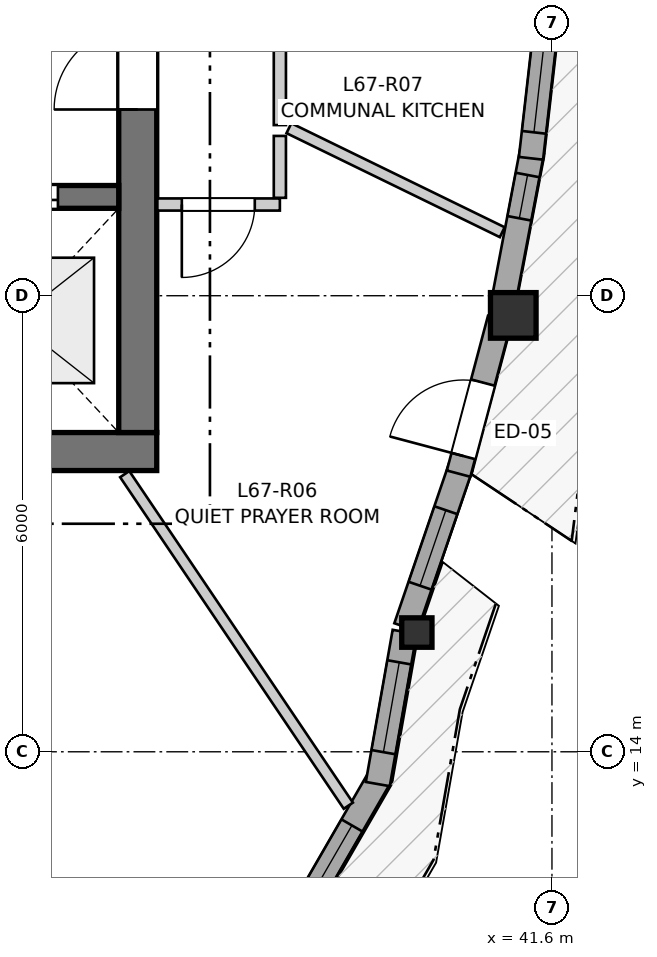
"""IFC4 building model, lengths in metres.
Left out: names, types, materials, properties, quantities, classifications, styles, units other than length and angle.
Written with IfcOpenShell. Run it as: python <this file> out.ifc"""

import sys

from ifc_helpers import new_model, si_unit, direction, frame, frame_2d, origin, origin_2d, place, context, subcontext, project, spatial, rectangle, i_section, extrude, source, transform, mapped, element, fill, save


model = new_model("IFC4")
c1 = context("Model", 3, precision=1e-05, world=origin(), true_north=direction((0.0, 1.0)))
c2 = subcontext(c1, "Body", "Model", "MODEL_VIEW")
j1 = project(units=[si_unit("LENGTHUNIT", "METRE"), si_unit("PLANEANGLEUNIT", "RADIAN")], contexts=[c1])
p1 = place(None, origin())
s1 = spatial("IfcSite", under=j1, at=p1, CompositionType="ELEMENT")
p2 = place(p1, origin())
s2 = spatial("IfcBuilding", under=s1, at=p2, CompositionType="ELEMENT")
p3 = place(p2, frame((0.0, 0.0, 224.4)))
s3 = spatial("IfcBuildingStorey", under=s2, at=p3, CompositionType="ELEMENT", Elevation=224.4)
p4 = place(p3, frame((24.3, 17.95, 0.0), z_axis=(0.0, 0.0, 1.0), x_axis=(1.0, 0.0, 0.0)))
e1 = element("IfcWall", 1, at=p4, inside=s3, PredefinedType="SHEAR", context=c2, shape_type="SweptSolid", body=[
    extrude(rectangle(XDim=12.1, YDim=0.5, at=frame_2d((6.05, 0.0))), origin(), (0.0, 0.0, 1.0), 2.96),
])
p5 = place(p3, frame((36.15, 18.2, 0.0), z_axis=(0.0, 0.0, 1.0), x_axis=(0.0, 1.0, 0.0)))
e2 = element("IfcWall", 2, at=p5, inside=s3, PredefinedType="SHEAR", context=c2, shape_type="SweptSolid", body=[
    extrude(rectangle(XDim=15.6, YDim=0.5, at=frame_2d((7.8, 0.0))), origin(), (0.0, 0.0, 1.0), 2.96),
])
p6 = place(p5, frame((4.25, 0.0, 0.0)))
e3 = element("IfcOpeningElement", 3, at=p6, cuts=e2, PredefinedType="OPENING", context=c2, shape_type="SweptSolid", body=[
    extrude(rectangle(XDim=1.1, YDim=2.15, at=frame_2d((0.55, 1.075))), frame((0.0, 0.26, 0.0), z_axis=(0.0, -1.0, 0.0), x_axis=(1.0, 0.0, 0.0)), (0.0, 0.0, 1.0), 0.52),
])
p7 = place(p5, frame((10.25, 0.0, 0.0)))
e4 = element("IfcOpeningElement", 4, at=p7, cuts=e2, PredefinedType="OPENING", context=c2, shape_type="SweptSolid", body=[
    extrude(rectangle(XDim=1.1, YDim=2.15, at=frame_2d((0.55, 1.075))), frame((0.0, 0.26, 0.0), z_axis=(0.0, -1.0, 0.0), x_axis=(1.0, 0.0, 0.0)), (0.0, 0.0, 1.0), 0.52),
])
p8 = place(p3, frame((24.8, 21.3, 0.0), z_axis=(0.0, 0.0, 1.0), x_axis=(1.0, 0.0, 0.0)))
e5 = element("IfcWall", 5, at=p8, inside=s3, PredefinedType="SHEAR", context=c2, shape_type="SweptSolid", body=[
    extrude(rectangle(XDim=11.1, YDim=0.3, at=frame_2d((5.55, 0.0))), origin(), (0.0, 0.0, 1.0), 2.96),
])
p9 = place(p8, frame((6.22, 0.0, 0.0)))
e6 = element("IfcOpeningElement", 6, at=p9, cuts=e5, PredefinedType="OPENING", context=c2, shape_type="SweptSolid", body=[
    extrude(rectangle(XDim=0.98, YDim=2.15, at=frame_2d((0.49, 1.075))), frame((0.0, 0.16, 0.0), z_axis=(0.0, -1.0, 0.0), x_axis=(1.0, 0.0, 0.0)), (0.0, 0.0, 1.0), 0.32),
])
p10 = place(p8, frame((9.15, 0.0, 0.0)))
e7 = element("IfcOpeningElement", 7, at=p10, cuts=e5, PredefinedType="OPENING", context=c2, shape_type="SweptSolid", body=[
    extrude(rectangle(XDim=1.15, YDim=2.15, at=frame_2d((0.575, 1.075))), frame((0.0, 0.16, 0.0), z_axis=(0.0, -1.0, 0.0), x_axis=(1.0, 0.0, 0.0)), (0.0, 0.0, 1.0), 0.32),
])
m1 = source(origin(), c2, "Body", "SweptSolid", [
    extrude(i_section(OverallWidth=0.398, OverallDepth=0.387, WebThickness=0.019, FlangeThickness=0.03, FilletRadius=0.015, at=origin_2d()), origin(), (0.0, 0.0, 1.0), 2.96),
])
p11 = place(p3, frame((39.823, 15.569, 0.0), z_axis=(0.0, 0.0, 1.0), x_axis=(1.0, 0.0, 0.0)))
e8 = element("IfcColumn", 8, at=p11, inside=s3, PredefinedType="PILASTER", context=c2, shape_type="MappedRepresentation", body=[
    mapped(m1, transform((0.0, 0.0, 0.0), x_axis=(1.0, 0.0, 0.0), y_axis=(0.0, 1.0, 0.0), z_axis=(0.0, 0.0, 1.0), scale=1.0)),
])
m2 = source(origin(), c2, "Body", "SweptSolid", [
    extrude(rectangle(XDim=0.6, YDim=0.6, at=origin_2d()), origin(), (0.0, 0.0, 1.0), 2.96),
])
p12 = place(p3, frame((41.091, 19.741, 0.0), z_axis=(0.0, 0.0, 1.0), x_axis=(1.0, 0.0, 0.0)))
e9 = element("IfcColumn", 9, at=p12, inside=s3, PredefinedType="COLUMN", context=c2, shape_type="MappedRepresentation", body=[
    mapped(m2, transform((0.0, 0.0, 0.0), x_axis=(1.0, 0.0, 0.0), y_axis=(0.0, 1.0, 0.0), z_axis=(0.0, 0.0, 1.0), scale=1.0)),
])
p13 = place(p3, frame((38.308, 11.888, 0.0), z_axis=(0.0, 0.0, 1.0), x_axis=(0.49990781971, 0.866078617559, 0.0)))
e10 = element("IfcWall", 10, at=p13, inside=s3, PredefinedType="SOLIDWALL", context=c2, shape_type="SweptSolid", body=[
    extrude(rectangle(XDim=2.09, YDim=0.32, at=frame_2d((1.045, 0.0))), origin(), (0.0, 0.0, 1.0), 2.58),
])
p14 = place(p13, frame((0.271, 0.0, 0.82)))
e11 = element("IfcOpeningElement", 11, at=p14, cuts=e10, PredefinedType="OPENING", context=c2, shape_type="SweptSolid", body=[
    extrude(rectangle(XDim=1.05, YDim=1.45, at=frame_2d((0.525, 0.725))), frame((0.0, 0.17, 0.0), z_axis=(0.0, -1.0, 0.0), x_axis=(1.0, 0.0, 0.0)), (0.0, 0.0, 1.0), 0.34),
])
p15 = place(p3, frame((39.309, 13.575, 0.0), z_axis=(0.0, 0.0, 1.0), x_axis=(0.17370309897, 0.984798067326, 0.0)))
e12 = element("IfcWall", 12, at=p15, inside=s3, PredefinedType="SOLIDWALL", context=c2, shape_type="SweptSolid", body=[
    extrude(rectangle(XDim=2.032, YDim=0.32, at=frame_2d((1.016, 0.0))), origin(), (0.0, 0.0, 1.0), 2.58),
])
p16 = place(p15, frame((0.426, 0.0, 0.82)))
e13 = element("IfcOpeningElement", 13, at=p16, cuts=e12, PredefinedType="OPENING", context=c2, shape_type="SweptSolid", body=[
    extrude(rectangle(XDim=1.2, YDim=1.45, at=frame_2d((0.6, 0.725))), frame((0.0, 0.17, 0.0), z_axis=(0.0, -1.0, 0.0), x_axis=(1.0, 0.0, 0.0)), (0.0, 0.0, 1.0), 0.34),
])
p17 = place(p3, frame((39.677, 15.639, 0.0), z_axis=(0.0, 0.0, 1.0), x_axis=(0.323664392341, 0.946171951143, 0.0)))
e14 = element("IfcWall", 14, at=p17, inside=s3, PredefinedType="SOLIDWALL", context=c2, shape_type="SweptSolid", body=[
    extrude(rectangle(XDim=2.223, YDim=0.32, at=frame_2d((1.111, 0.0))), origin(), (0.0, 0.0, 1.0), 2.58),
])
p18 = place(p17, frame((0.576, 0.0, 0.82)))
e15 = element("IfcOpeningElement", 15, at=p18, cuts=e14, PredefinedType="OPENING", context=c2, shape_type="SweptSolid", body=[
    extrude(rectangle(XDim=1.05, YDim=1.45, at=frame_2d((0.525, 0.725))), frame((0.0, 0.17, 0.0), z_axis=(0.0, -1.0, 0.0), x_axis=(1.0, 0.0, 0.0)), (0.0, 0.0, 1.0), 0.34),
])
p19 = place(p3, frame((40.372, 17.659, 0.0), z_axis=(0.0, 0.0, 1.0), x_axis=(0.2570422776, 0.966400159109, 0.0)))
e16 = element("IfcWall", 16, at=p19, inside=s3, PredefinedType="SOLIDWALL", context=c2, shape_type="SweptSolid", body=[
    extrude(rectangle(XDim=2.107, YDim=0.32, at=frame_2d((1.053, 0.0))), origin(), (0.0, 0.0, 1.0), 2.58),
])
p20 = place(p19, frame((0.24, 0.0, 0.0)))
e17 = element("IfcOpeningElement", 17, at=p20, cuts=e16, PredefinedType="OPENING", context=c2, shape_type="SweptSolid", body=[
    extrude(rectangle(XDim=1.0, YDim=2.1, at=frame_2d((0.5, 1.05))), frame((0.0, 0.17, 0.0), z_axis=(0.0, -1.0, 0.0), x_axis=(1.0, 0.0, 0.0)), (0.0, 0.0, 1.0), 0.34),
])
p21 = place(p3, frame((40.95, 19.86, 0.0), z_axis=(0.0, 0.0, 1.0), x_axis=(0.18667884524, 0.982420993638, 0.0)))
e18 = element("IfcWall", 18, at=p21, inside=s3, PredefinedType="SOLIDWALL", context=c2, shape_type="SweptSolid", body=[
    extrude(rectangle(XDim=2.072, YDim=0.32, at=frame_2d((1.036, 0.0))), origin(), (0.0, 0.0, 1.0), 2.58),
])
p22 = place(p21, frame((1.18, 0.0, 0.82)))
e19 = element("IfcOpeningElement", 19, at=p22, cuts=e18, PredefinedType="OPENING", context=c2, shape_type="SweptSolid", body=[
    extrude(rectangle(XDim=0.58, YDim=1.35, at=frame_2d((0.29, 0.675))), frame((0.0, 0.17, 0.0), z_axis=(0.0, -1.0, 0.0), x_axis=(1.0, 0.0, 0.0)), (0.0, 0.0, 1.0), 0.34),
])
p23 = place(p3, frame((41.324, 21.808, 0.0), z_axis=(0.0, 0.0, 1.0), x_axis=(0.113315758547, 0.993559026362, 0.0)))
e20 = element("IfcWall", 20, at=p23, inside=s3, PredefinedType="SOLIDWALL", context=c2, shape_type="SweptSolid", body=[
    extrude(rectangle(XDim=2.118, YDim=0.32, at=frame_2d((1.059, 0.0))), origin(), (0.0, 0.0, 1.0), 2.58),
])
p24 = place(p23, frame((0.344, 0.0, 0.82)))
e21 = element("IfcOpeningElement", 21, at=p24, cuts=e20, PredefinedType="OPENING", context=c2, shape_type="SweptSolid", body=[
    extrude(rectangle(XDim=1.45, YDim=1.25, at=frame_2d((0.725, 0.625))), frame((0.0, 0.17, 0.0), z_axis=(0.0, -1.0, 0.0), x_axis=(1.0, 0.0, 0.0)), (0.0, 0.0, 1.0), 0.34),
])
p25 = place(p3, frame((38.02, 25.659, 0.0), z_axis=(0.0, 0.0, 1.0), x_axis=(0.0, -1.0, 0.0)))
e22 = element("IfcWall", 22, at=p25, inside=s3, PredefinedType="PARTITIONING", context=c2, shape_type="SweptSolid", body=[
    extrude(rectangle(XDim=3.414, YDim=0.16, at=frame_2d((1.707, 0.0))), origin(), (0.0, 0.0, 1.0), 2.628),
])
p26 = place(p25, frame((1.033, 0.0, 0.0)))
e23 = element("IfcOpeningElement", 23, at=p26, cuts=e22, PredefinedType="OPENING", context=c2, shape_type="SweptSolid", body=[
    extrude(rectangle(XDim=1.3, YDim=2.1, at=frame_2d((0.65, 1.05))), frame((0.0, 0.09, 0.0), z_axis=(0.0, -1.0, 0.0), x_axis=(1.0, 0.0, 0.0)), (0.0, 0.0, 1.0), 0.18),
])
p27 = place(p3, frame((38.02, 21.2, 0.0), z_axis=(0.0, 0.0, 1.0), x_axis=(-1.0, 0.0, 0.0)))
e24 = element("IfcWall", 24, at=p27, inside=s3, PredefinedType="PARTITIONING", context=c2, shape_type="SweptSolid", body=[
    extrude(rectangle(XDim=1.612, YDim=0.16, at=frame_2d((0.806, 0.0))), origin(), (0.0, 0.0, 1.0), 2.96),
])
p28 = place(p27, frame((0.33, 0.0, 0.0)))
e25 = element("IfcOpeningElement", 25, at=p28, cuts=e24, PredefinedType="OPENING", context=c2, shape_type="SweptSolid", body=[
    extrude(rectangle(XDim=0.96, YDim=2.1, at=frame_2d((0.48, 1.05))), frame((0.0, 0.09, 0.0), z_axis=(0.0, -1.0, 0.0), x_axis=(1.0, 0.0, 0.0)), (0.0, 0.0, 1.0), 0.18),
])
p29 = place(p3, frame((35.979, 17.653, 0.0), z_axis=(0.0, 0.0, 1.0), x_axis=(0.559125350393, -0.829083133677, 0.0)))
e26 = element("IfcWall", 26, at=p29, inside=s3, PredefinedType="PARTITIONING", context=c2, shape_type="SweptSolid", body=[
    extrude(rectangle(XDim=5.262, YDim=0.145, at=frame_2d((2.631, 0.0))), origin(), (0.0, 0.0, 1.0), 2.96),
])
p30 = place(p3, frame((38.139, 22.204, 0.0), z_axis=(0.0, 0.0, 1.0), x_axis=(0.898869860356, -0.43821567081, 0.0)))
e27 = element("IfcWall", 27, at=p30, inside=s3, PredefinedType="PARTITIONING", context=c2, shape_type="SweptSolid", body=[
    extrude(rectangle(XDim=3.123, YDim=0.145, at=frame_2d((1.562, 0.0))), origin(), (0.0, 0.0, 1.0), 2.96),
])
p31 = place(p3, frame((38.02, 21.288, 0.0), z_axis=(0.0, 0.0, 1.0), x_axis=(0.0, 1.0, 0.0)))
e28 = element("IfcWall", 28, at=p31, inside=s3, PredefinedType="PARTITIONING", context=c2, shape_type="SweptSolid", body=[
    extrude(rectangle(XDim=0.814, YDim=0.16, at=frame_2d((0.407, 0.0))), origin(), (0.0, 0.0, 1.0), 2.628),
])
m3 = source(origin(), c2, "Body", "SweptSolid", [
    extrude(rectangle(XDim=1.05, YDim=1.45, at=frame_2d((0.525, 0.725))), frame((0.0, 0.03, 0.0), z_axis=(0.0, -1.0, 0.0), x_axis=(1.0, 0.0, 0.0)), (0.0, 0.0, 1.0), 0.06),
])
p32 = place(p14, origin())
e29 = element("IfcWindow", 29, at=p32, inside=s3, PartitioningType="SINGLE_PANEL", PredefinedType="WINDOW", context=c2, shape_type="MappedRepresentation", body=[
    mapped(m3, transform((0.0, 0.0, 0.0), x_axis=(1.0, 0.0, 0.0), y_axis=(0.0, 1.0, 0.0), z_axis=(0.0, 0.0, 1.0), scale=1.0)),
])
fill(e11, e29)
m4 = source(origin(), c2, "Body", "SweptSolid", [
    extrude(rectangle(XDim=1.2, YDim=1.45, at=frame_2d((0.6, 0.725))), frame((0.0, 0.03, 0.0), z_axis=(0.0, -1.0, 0.0), x_axis=(1.0, 0.0, 0.0)), (0.0, 0.0, 1.0), 0.06),
])
p33 = place(p16, origin())
e30 = element("IfcWindow", 30, at=p33, inside=s3, PartitioningType="SINGLE_PANEL", PredefinedType="WINDOW", context=c2, shape_type="MappedRepresentation", body=[
    mapped(m4, transform((0.0, 0.0, 0.0), x_axis=(1.0, 0.0, 0.0), y_axis=(0.0, 1.0, 0.0), z_axis=(0.0, 0.0, 1.0), scale=1.0)),
])
fill(e13, e30)
p34 = place(p18, origin())
e31 = element("IfcWindow", 31, at=p34, inside=s3, PartitioningType="SINGLE_PANEL", PredefinedType="WINDOW", context=c2, shape_type="MappedRepresentation", body=[
    mapped(m3, transform((0.0, 0.0, 0.0), x_axis=(1.0, 0.0, 0.0), y_axis=(0.0, 1.0, 0.0), z_axis=(0.0, 0.0, 1.0), scale=1.0)),
])
fill(e15, e31)
m5 = source(origin(), c2, "Body", "SweptSolid", [
    extrude(rectangle(XDim=0.58, YDim=1.35, at=frame_2d((0.29, 0.675))), frame((0.0, 0.03, 0.0), z_axis=(0.0, -1.0, 0.0), x_axis=(1.0, 0.0, 0.0)), (0.0, 0.0, 1.0), 0.06),
])
p35 = place(p22, origin())
e32 = element("IfcWindow", 32, at=p35, inside=s3, PartitioningType="SINGLE_PANEL", PredefinedType="WINDOW", context=c2, shape_type="MappedRepresentation", body=[
    mapped(m5, transform((0.0, 0.0, 0.0), x_axis=(1.0, 0.0, 0.0), y_axis=(0.0, 1.0, 0.0), z_axis=(0.0, 0.0, 1.0), scale=1.0)),
])
fill(e19, e32)
m6 = source(origin(), c2, "Body", "SweptSolid", [
    extrude(rectangle(XDim=1.45, YDim=1.25, at=frame_2d((0.725, 0.625))), frame((0.0, 0.03, 0.0), z_axis=(0.0, -1.0, 0.0), x_axis=(1.0, 0.0, 0.0)), (0.0, 0.0, 1.0), 0.06),
])
p36 = place(p24, origin())
e33 = element("IfcWindow", 33, at=p36, inside=s3, PartitioningType="SINGLE_PANEL", PredefinedType="WINDOW", context=c2, shape_type="MappedRepresentation", body=[
    mapped(m6, transform((0.0, 0.0, 0.0), x_axis=(1.0, 0.0, 0.0), y_axis=(0.0, 1.0, 0.0), z_axis=(0.0, 0.0, 1.0), scale=1.0)),
])
fill(e21, e33)
m7 = source(origin(), c2, "Body", "SweptSolid", [
    extrude(rectangle(XDim=1.0, YDim=2.1, at=frame_2d((0.5, 1.05))), frame((0.0, 0.025, 0.0), z_axis=(0.0, -1.0, 0.0), x_axis=(1.0, 0.0, 0.0)), (0.0, 0.0, 1.0), 0.05),
])
p37 = place(p20, origin())
e34 = element("IfcDoor", 34, at=p37, inside=s3, OperationType="SINGLE_SWING_LEFT", PredefinedType="DOOR", context=c2, shape_type="MappedRepresentation", body=[
    mapped(m7, transform((0.0, 0.0, 0.0), x_axis=(1.0, 0.0, 0.0), y_axis=(0.0, 1.0, 0.0), z_axis=(0.0, 0.0, 1.0), scale=1.0)),
])
fill(e17, e34)
m8 = source(origin(), c2, "Body", "SweptSolid", [
    extrude(rectangle(XDim=1.15, YDim=2.15, at=frame_2d((0.575, 1.075))), frame((0.0, 0.025, 0.0), z_axis=(0.0, -1.0, 0.0), x_axis=(1.0, 0.0, 0.0)), (0.0, 0.0, 1.0), 0.05),
])
p38 = place(p10, origin())
e35 = element("IfcDoor", 35, at=p38, inside=s3, OperationType="DOUBLE_DOOR_SLIDING", PredefinedType="DOOR", context=c2, shape_type="MappedRepresentation", body=[
    mapped(m8, transform((0.0, 0.0, 0.0), x_axis=(1.0, 0.0, 0.0), y_axis=(0.0, 1.0, 0.0), z_axis=(0.0, 0.0, 1.0), scale=1.0)),
])
fill(e7, e35)
m9 = source(origin(), c2, "Body", "SweptSolid", [
    extrude(rectangle(XDim=1.1, YDim=2.15, at=frame_2d((0.55, 1.075))), frame((0.0, 0.025, 0.0), z_axis=(0.0, -1.0, 0.0), x_axis=(1.0, 0.0, 0.0)), (0.0, 0.0, 1.0), 0.05),
])
p39 = place(p6, origin())
e36 = element("IfcDoor", 36, at=p39, inside=s3, OperationType="SINGLE_SWING_LEFT", PredefinedType="DOOR", context=c2, shape_type="MappedRepresentation", body=[
    mapped(m9, transform((0.0, 0.0, 0.0), x_axis=(1.0, 0.0, 0.0), y_axis=(0.0, 1.0, 0.0), z_axis=(0.0, 0.0, 1.0), scale=1.0)),
])
fill(e3, e36)
m10 = source(origin(), c2, "Body", "SweptSolid", [
    extrude(rectangle(XDim=0.96, YDim=2.1, at=frame_2d((0.48, 1.05))), frame((0.0, 0.025, 0.0), z_axis=(0.0, -1.0, 0.0), x_axis=(1.0, 0.0, 0.0)), (0.0, 0.0, 1.0), 0.05),
])
p40 = place(p28, origin())
e37 = element("IfcDoor", 37, at=p40, inside=s3, OperationType="SINGLE_SWING_RIGHT", PredefinedType="DOOR", context=c2, shape_type="MappedRepresentation", body=[
    mapped(m10, transform((0.0, 0.0, 0.0), x_axis=(1.0, 0.0, 0.0), y_axis=(0.0, 1.0, 0.0), z_axis=(0.0, 0.0, 1.0), scale=1.0)),
])
fill(e25, e37)
save(model, sys.argv[1])
